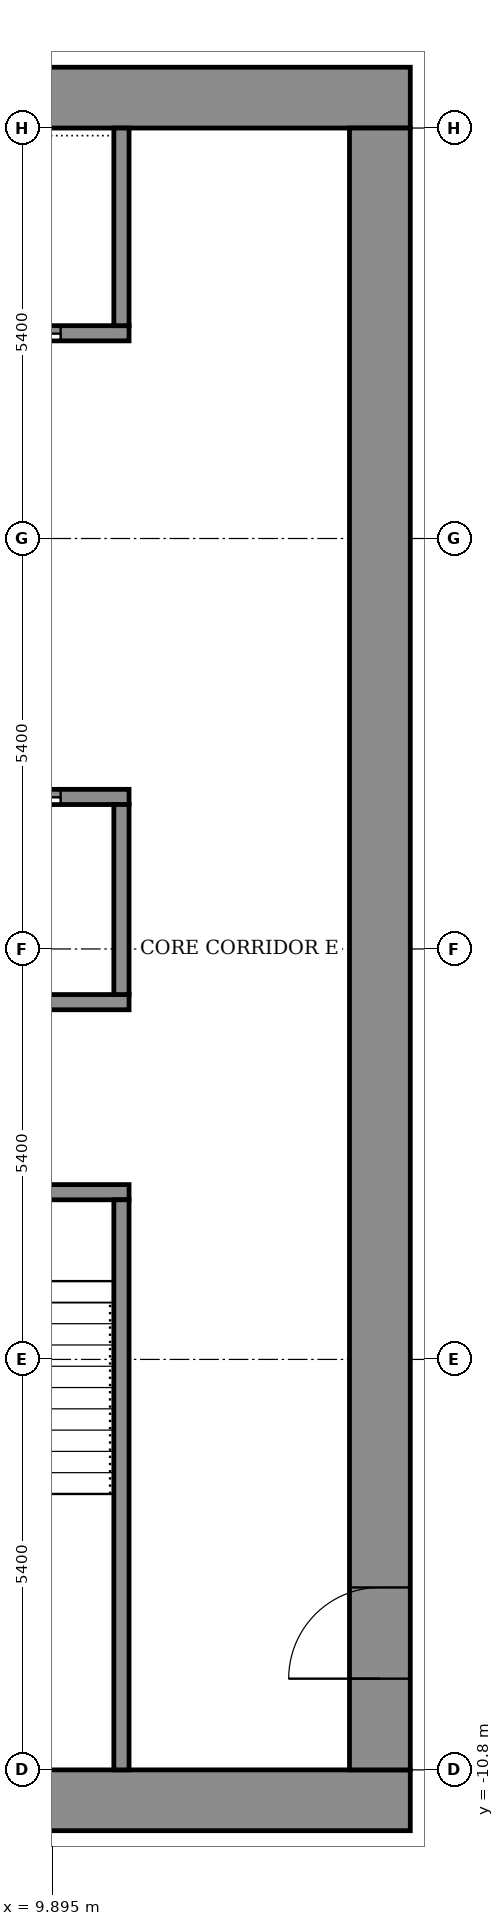
"""IFC4 building model, lengths in metres.
Left out: names, types, materials, properties, quantities, classifications, styles, units other than length and angle.
Written with IfcOpenShell. Run it as: python <this file> out.ifc"""

import sys

from ifc_helpers import new_model, si_unit, direction, frame, frame_2d, origin, place, context, subcontext, project, spatial, rectangle, extrude, element, fill, save


model = new_model("IFC4")
c1 = context("Model", 3, precision=1e-05, world=origin(), true_north=direction((0.0, 1.0)))
c2 = subcontext(c1, "Body", "Model", "MODEL_VIEW")
j1 = project(units=[si_unit("LENGTHUNIT", "METRE"), si_unit("PLANEANGLEUNIT", "RADIAN")], contexts=[c1])
p1 = place(None, origin())
s1 = spatial("IfcSite", under=j1, at=p1, CompositionType="ELEMENT")
p2 = place(p1, origin())
s2 = spatial("IfcBuilding", under=s1, at=p2, CompositionType="ELEMENT")
p3 = place(p2, frame((0.0, 0.0, 201.5)))
s3 = spatial("IfcBuildingStorey", under=s2, at=p3, CompositionType="ELEMENT", Elevation=201.5)
for number, where, z_axis, x_axis in (
    (1, (-14.6, -11.2, 0.0), (0.0, 0.0, 1.0), (1.0, 0.0, 0.0)),
    (2, (-14.6, 11.2, 0.0), (0.0, 0.0, 1.0), (1.0, 0.0, 0.0)),
):
    element("IfcWall", number, at=place(p3, frame(where, z_axis=z_axis, x_axis=x_axis)), inside=s3, PredefinedType="SHEAR", context=c2, shape_type="SweptSolid", body=[
        extrude(rectangle(XDim=29.2, YDim=0.8, at=frame_2d((14.6, 0.0))), origin(), (0.0, 0.0, 1.0), 3.6),
    ])
p4 = place(p3, frame((14.2, -10.8, 0.0), z_axis=(0.0, 0.0, 1.0), x_axis=(0.0, 1.0, 0.0)))
e3 = element("IfcWall", 3, at=p4, inside=s3, PredefinedType="SHEAR", context=c2, shape_type="SweptSolid", body=[
    extrude(rectangle(XDim=21.6, YDim=0.8, at=frame_2d((10.8, 0.0))), origin(), (0.0, 0.0, 1.0), 3.6),
])
p5 = place(p4, frame((1.2, 0.0, 0.0)))
e4 = element("IfcOpeningElement", 4, at=p5, cuts=e3, PredefinedType="OPENING", context=c2, shape_type="SweptSolid", body=[
    extrude(rectangle(XDim=1.2, YDim=2.1, at=frame_2d((0.6, 1.05))), frame((0.0, 0.41, 0.0), z_axis=(0.0, -1.0, 0.0), x_axis=(1.0, 0.0, 0.0)), (0.0, 0.0, 1.0), 0.82),
])
p6 = place(p3, frame((-10.9, -3.2, 0.0), z_axis=(0.0, 0.0, 1.0), x_axis=(1.0, 0.0, 0.0)))
e5 = element("IfcWall", 5, at=p6, inside=s3, PredefinedType="SHEAR", context=c2, shape_type="SweptSolid", body=[
    extrude(rectangle(XDim=21.8, YDim=0.2, at=frame_2d((10.9, 0.0))), origin(), (0.0, 0.0, 1.0), 3.05),
])
p7 = place(p6, frame((1.075, 0.0, 0.0)))
e6 = element("IfcOpeningElement", 6, at=p7, cuts=e5, PredefinedType="OPENING", context=c2, shape_type="SweptSolid", body=[
    extrude(rectangle(XDim=1.1, YDim=2.1, at=frame_2d((0.55, 1.05))), frame((0.0, 0.11, 0.0), z_axis=(0.0, -1.0, 0.0), x_axis=(1.0, 0.0, 0.0)), (0.0, 0.0, 1.0), 0.22),
])
p8 = place(p6, frame((10.325, 0.0, 0.0)))
e7 = element("IfcOpeningElement", 7, at=p8, cuts=e5, PredefinedType="OPENING", context=c2, shape_type="SweptSolid", body=[
    extrude(rectangle(XDim=1.1, YDim=2.1, at=frame_2d((0.55, 1.05))), frame((0.0, 0.11, 0.0), z_axis=(0.0, -1.0, 0.0), x_axis=(1.0, 0.0, 0.0)), (0.0, 0.0, 1.0), 0.22),
])
p9 = place(p6, frame((19.625, 0.0, 0.0)))
e8 = element("IfcOpeningElement", 8, at=p9, cuts=e5, PredefinedType="OPENING", context=c2, shape_type="SweptSolid", body=[
    extrude(rectangle(XDim=1.1, YDim=2.1, at=frame_2d((0.55, 1.05))), frame((0.0, 0.11, 0.0), z_axis=(0.0, -1.0, 0.0), x_axis=(1.0, 0.0, 0.0)), (0.0, 0.0, 1.0), 0.22),
])
p10 = place(p6, frame((5.7, 0.0, 0.0)))
e9 = element("IfcOpeningElement", 9, at=p10, cuts=e5, PredefinedType="OPENING", context=c2, shape_type="SweptSolid", body=[
    extrude(rectangle(XDim=1.1, YDim=2.1, at=frame_2d((0.55, 1.05))), frame((0.0, 0.11, 0.0), z_axis=(0.0, -1.0, 0.0), x_axis=(1.0, 0.0, 0.0)), (0.0, 0.0, 1.0), 0.22),
])
p11 = place(p6, frame((14.975, 0.0, 0.0)))
e10 = element("IfcOpeningElement", 10, at=p11, cuts=e5, PredefinedType="OPENING", context=c2, shape_type="SweptSolid", body=[
    extrude(rectangle(XDim=1.1, YDim=2.1, at=frame_2d((0.55, 1.05))), frame((0.0, 0.11, 0.0), z_axis=(0.0, -1.0, 0.0), x_axis=(1.0, 0.0, 0.0)), (0.0, 0.0, 1.0), 0.22),
])
p12 = place(p3, frame((-10.9, -0.7, 0.0), z_axis=(0.0, 0.0, 1.0), x_axis=(1.0, 0.0, 0.0)))
e11 = element("IfcWall", 11, at=p12, inside=s3, PredefinedType="SHEAR", context=c2, shape_type="SweptSolid", body=[
    extrude(rectangle(XDim=21.8, YDim=0.2, at=frame_2d((10.9, 0.0))), origin(), (0.0, 0.0, 1.0), 3.05),
])
p13 = place(p3, frame((-10.9, 2.0, 0.0), z_axis=(0.0, 0.0, 1.0), x_axis=(1.0, 0.0, 0.0)))
e12 = element("IfcWall", 12, at=p13, inside=s3, PredefinedType="SHEAR", context=c2, shape_type="SweptSolid", body=[
    extrude(rectangle(XDim=21.8, YDim=0.2, at=frame_2d((10.9, 0.0))), origin(), (0.0, 0.0, 1.0), 3.05),
])
p14 = place(p13, frame((14.4, 0.0, 0.0)))
e13 = element("IfcOpeningElement", 13, at=p14, cuts=e12, PredefinedType="OPENING", context=c2, shape_type="SweptSolid", body=[
    extrude(rectangle(XDim=1.1, YDim=2.1, at=frame_2d((0.55, 1.05))), frame((0.0, 0.11, 0.0), z_axis=(0.0, -1.0, 0.0), x_axis=(1.0, 0.0, 0.0)), (0.0, 0.0, 1.0), 0.22),
])
p15 = place(p13, frame((17.1, 0.0, 0.0)))
e14 = element("IfcOpeningElement", 14, at=p15, cuts=e12, PredefinedType="OPENING", context=c2, shape_type="SweptSolid", body=[
    extrude(rectangle(XDim=1.1, YDim=2.1, at=frame_2d((0.55, 1.05))), frame((0.0, 0.11, 0.0), z_axis=(0.0, -1.0, 0.0), x_axis=(1.0, 0.0, 0.0)), (0.0, 0.0, 1.0), 0.22),
])
p16 = place(p13, frame((19.8, 0.0, 0.0)))
e15 = element("IfcOpeningElement", 15, at=p16, cuts=e12, PredefinedType="OPENING", context=c2, shape_type="SweptSolid", body=[
    extrude(rectangle(XDim=1.1, YDim=2.1, at=frame_2d((0.55, 1.05))), frame((0.0, 0.11, 0.0), z_axis=(0.0, -1.0, 0.0), x_axis=(1.0, 0.0, 0.0)), (0.0, 0.0, 1.0), 0.22),
])
p17 = place(p13, frame((1.675, 0.0, 0.0)))
e16 = element("IfcOpeningElement", 16, at=p17, cuts=e12, PredefinedType="OPENING", context=c2, shape_type="SweptSolid", body=[
    extrude(rectangle(XDim=0.9, YDim=2.1, at=frame_2d((0.45, 1.05))), frame((0.0, 0.11, 0.0), z_axis=(0.0, -1.0, 0.0), x_axis=(1.0, 0.0, 0.0)), (0.0, 0.0, 1.0), 0.22),
])
p18 = place(p13, frame((8.425, 0.0, 0.0)))
e17 = element("IfcOpeningElement", 17, at=p18, cuts=e12, PredefinedType="OPENING", context=c2, shape_type="SweptSolid", body=[
    extrude(rectangle(XDim=0.9, YDim=2.1, at=frame_2d((0.45, 1.05))), frame((0.0, 0.11, 0.0), z_axis=(0.0, -1.0, 0.0), x_axis=(1.0, 0.0, 0.0)), (0.0, 0.0, 1.0), 0.22),
])
p19 = place(p3, frame((-10.9, 8.1, 0.0), z_axis=(0.0, 0.0, 1.0), x_axis=(1.0, 0.0, 0.0)))
e18 = element("IfcWall", 18, at=p19, inside=s3, PredefinedType="SHEAR", context=c2, shape_type="SweptSolid", body=[
    extrude(rectangle(XDim=21.8, YDim=0.2, at=frame_2d((10.9, 0.0))), origin(), (0.0, 0.0, 1.0), 3.05),
])
p20 = place(p19, frame((14.4, 0.0, 0.0)))
e19 = element("IfcOpeningElement", 19, at=p20, cuts=e18, PredefinedType="OPENING", context=c2, shape_type="SweptSolid", body=[
    extrude(rectangle(XDim=1.1, YDim=2.1, at=frame_2d((0.55, 1.05))), frame((0.0, 0.11, 0.0), z_axis=(0.0, -1.0, 0.0), x_axis=(1.0, 0.0, 0.0)), (0.0, 0.0, 1.0), 0.22),
])
p21 = place(p19, frame((17.1, 0.0, 0.0)))
e20 = element("IfcOpeningElement", 20, at=p21, cuts=e18, PredefinedType="OPENING", context=c2, shape_type="SweptSolid", body=[
    extrude(rectangle(XDim=1.1, YDim=2.1, at=frame_2d((0.55, 1.05))), frame((0.0, 0.11, 0.0), z_axis=(0.0, -1.0, 0.0), x_axis=(1.0, 0.0, 0.0)), (0.0, 0.0, 1.0), 0.22),
])
p22 = place(p19, frame((19.8, 0.0, 0.0)))
e21 = element("IfcOpeningElement", 21, at=p22, cuts=e18, PredefinedType="OPENING", context=c2, shape_type="SweptSolid", body=[
    extrude(rectangle(XDim=1.1, YDim=2.1, at=frame_2d((0.55, 1.05))), frame((0.0, 0.11, 0.0), z_axis=(0.0, -1.0, 0.0), x_axis=(1.0, 0.0, 0.0)), (0.0, 0.0, 1.0), 0.22),
])
p23 = place(p19, frame((1.675, 0.0, 0.0)))
e22 = element("IfcOpeningElement", 22, at=p23, cuts=e18, PredefinedType="OPENING", context=c2, shape_type="SweptSolid", body=[
    extrude(rectangle(XDim=0.9, YDim=2.1, at=frame_2d((0.45, 1.05))), frame((0.0, 0.11, 0.0), z_axis=(0.0, -1.0, 0.0), x_axis=(1.0, 0.0, 0.0)), (0.0, 0.0, 1.0), 0.22),
])
p24 = place(p19, frame((8.425, 0.0, 0.0)))
e23 = element("IfcOpeningElement", 23, at=p24, cuts=e18, PredefinedType="OPENING", context=c2, shape_type="SweptSolid", body=[
    extrude(rectangle(XDim=0.9, YDim=2.1, at=frame_2d((0.45, 1.05))), frame((0.0, 0.11, 0.0), z_axis=(0.0, -1.0, 0.0), x_axis=(1.0, 0.0, 0.0)), (0.0, 0.0, 1.0), 0.22),
])
p25 = place(p3, frame((10.8, -10.8, 0.0), z_axis=(0.0, 0.0, 1.0), x_axis=(0.0, 1.0, 0.0)))
e24 = element("IfcWall", 24, at=p25, inside=s3, PredefinedType="SHEAR", context=c2, shape_type="SweptSolid", body=[
    extrude(rectangle(XDim=7.5, YDim=0.2, at=frame_2d((3.75, 0.0))), origin(), (0.0, 0.0, 1.0), 3.05),
])
p26 = place(p3, frame((10.8, -0.6, 0.0), z_axis=(0.0, 0.0, 1.0), x_axis=(0.0, 1.0, 0.0)))
e25 = element("IfcWall", 25, at=p26, inside=s3, PredefinedType="SHEAR", context=c2, shape_type="SweptSolid", body=[
    extrude(rectangle(XDim=2.5, YDim=0.2, at=frame_2d((1.25, 0.0))), origin(), (0.0, 0.0, 1.0), 3.05),
])
p27 = place(p3, frame((10.8, 8.2, 0.0), z_axis=(0.0, 0.0, 1.0), x_axis=(0.0, 1.0, 0.0)))
e26 = element("IfcWall", 26, at=p27, inside=s3, PredefinedType="SHEAR", context=c2, shape_type="SweptSolid", body=[
    extrude(rectangle(XDim=2.6, YDim=0.2, at=frame_2d((1.3, 0.0))), origin(), (0.0, 0.0, 1.0), 3.05),
])
p28 = place(p5, origin())
e27 = element("IfcDoor", 27, at=p28, inside=s3, OperationType="DOUBLE_DOOR_SINGLE_SWING", PredefinedType="DOOR", context=c2, shape_type="SweptSolid", body=[
    extrude(rectangle(XDim=1.2, YDim=2.1, at=frame_2d((0.6, 1.05))), frame((0.0, 0.025, 0.0), z_axis=(0.0, -1.0, 0.0), x_axis=(1.0, 0.0, 0.0)), (0.0, 0.0, 1.0), 0.05),
])
fill(e4, e27)
p29 = place(p16, origin())
e28 = element("IfcDoor", 28, at=p29, inside=s3, OperationType="SLIDING_TO_LEFT", PredefinedType="DOOR", context=c2, shape_type="SweptSolid", body=[
    extrude(rectangle(XDim=1.1, YDim=2.1, at=frame_2d((0.55, 1.05))), frame((0.0, 0.025, 0.0), z_axis=(0.0, -1.0, 0.0), x_axis=(1.0, 0.0, 0.0)), (0.0, 0.0, 1.0), 0.05),
])
fill(e15, e28)
p30 = place(p22, origin())
e29 = element("IfcDoor", 29, at=p30, inside=s3, OperationType="SLIDING_TO_LEFT", PredefinedType="DOOR", context=c2, shape_type="SweptSolid", body=[
    extrude(rectangle(XDim=1.1, YDim=2.1, at=frame_2d((0.55, 1.05))), frame((0.0, 0.025, 0.0), z_axis=(0.0, -1.0, 0.0), x_axis=(1.0, 0.0, 0.0)), (0.0, 0.0, 1.0), 0.05),
])
fill(e21, e29)
save(model, sys.argv[1])
